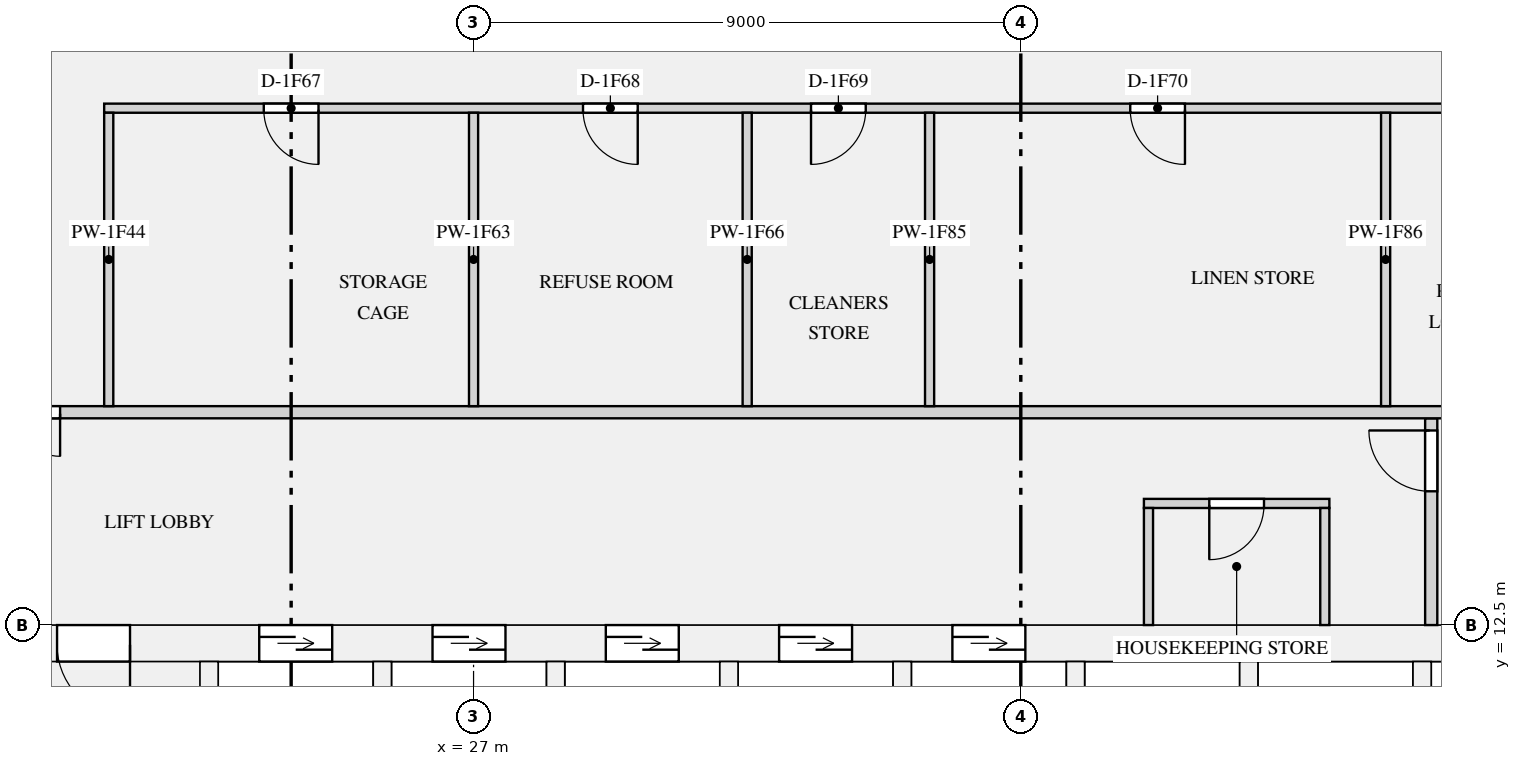
"""IFC4 building model, lengths in metres.
Left out: names, types, materials, properties, quantities, classifications, styles, units other than length and angle.
Written with IfcOpenShell. Run it as: python <this file> out.ifc"""

import sys

from ifc_helpers import new_model, si_unit, direction, frame, frame_2d, origin, place, context, subcontext, project, spatial, rectangle, extrude, element, fill, save


model = new_model("IFC4")
c1 = context("Model", 3, precision=1e-05, world=origin(), true_north=direction((0.0, 1.0)))
c2 = subcontext(c1, "Body", "Model", "MODEL_VIEW")
j1 = project(units=[si_unit("LENGTHUNIT", "METRE"), si_unit("PLANEANGLEUNIT", "RADIAN")], contexts=[c1])
p1 = place(None, origin())
s1 = spatial("IfcSite", under=j1, at=p1, CompositionType="ELEMENT")
p2 = place(p1, origin())
s2 = spatial("IfcBuilding", under=s1, at=p2, CompositionType="ELEMENT")
p3 = place(p2, frame((0.0, 0.0, 60.45)))
s3 = spatial("IfcBuildingStorey", under=s2, at=p3, CompositionType="ELEMENT", Elevation=60.45)
p4 = place(p3, frame((19.0, 12.2, 0.0), z_axis=(0.0, 0.0, 1.0), x_axis=(1.0, 0.0, 0.0)))
e1 = element("IfcWall", 1, at=p4, inside=s3, PredefinedType="SHEAR", context=c2, shape_type="SweptSolid", body=[
    extrude(rectangle(XDim=34.0, YDim=0.6, at=frame_2d((17.0, 0.0))), origin(), (0.0, 0.0, 1.0), 3.15),
])
p5 = place(p4, frame((4.475, 0.0, 0.0)))
e2 = element("IfcOpeningElement", 2, at=p5, cuts=e1, PredefinedType="OPENING", context=c2, shape_type="SweptSolid", body=[
    extrude(rectangle(XDim=1.2, YDim=2.1, at=frame_2d((0.6, 1.05))), frame((0.0, 0.31, 0.0), z_axis=(0.0, -1.0, 0.0), x_axis=(1.0, 0.0, 0.0)), (0.0, 0.0, 1.0), 0.62),
])
p6 = place(p4, frame((7.325, 0.0, 0.0)))
e3 = element("IfcOpeningElement", 3, at=p6, cuts=e1, PredefinedType="OPENING", context=c2, shape_type="SweptSolid", body=[
    extrude(rectangle(XDim=1.2, YDim=2.1, at=frame_2d((0.6, 1.05))), frame((0.0, 0.31, 0.0), z_axis=(0.0, -1.0, 0.0), x_axis=(1.0, 0.0, 0.0)), (0.0, 0.0, 1.0), 0.62),
])
p7 = place(p4, frame((10.175, 0.0, 0.0)))
e4 = element("IfcOpeningElement", 4, at=p7, cuts=e1, PredefinedType="OPENING", context=c2, shape_type="SweptSolid", body=[
    extrude(rectangle(XDim=1.2, YDim=2.1, at=frame_2d((0.6, 1.05))), frame((0.0, 0.31, 0.0), z_axis=(0.0, -1.0, 0.0), x_axis=(1.0, 0.0, 0.0)), (0.0, 0.0, 1.0), 0.62),
])
p8 = place(p4, frame((13.025, 0.0, 0.0)))
e5 = element("IfcOpeningElement", 5, at=p8, cuts=e1, PredefinedType="OPENING", context=c2, shape_type="SweptSolid", body=[
    extrude(rectangle(XDim=1.2, YDim=2.1, at=frame_2d((0.6, 1.05))), frame((0.0, 0.31, 0.0), z_axis=(0.0, -1.0, 0.0), x_axis=(1.0, 0.0, 0.0)), (0.0, 0.0, 1.0), 0.62),
])
p9 = place(p4, frame((15.875, 0.0, 0.0)))
e6 = element("IfcOpeningElement", 6, at=p9, cuts=e1, PredefinedType="OPENING", context=c2, shape_type="SweptSolid", body=[
    extrude(rectangle(XDim=1.2, YDim=2.1, at=frame_2d((0.6, 1.05))), frame((0.0, 0.31, 0.0), z_axis=(0.0, -1.0, 0.0), x_axis=(1.0, 0.0, 0.0)), (0.0, 0.0, 1.0), 0.62),
])
p10 = place(p4, frame((24.175, 0.0, 0.0)))
e7 = element("IfcOpeningElement", 7, at=p10, cuts=e1, PredefinedType="OPENING", context=c2, shape_type="SweptSolid", body=[
    extrude(rectangle(XDim=1.1, YDim=2.1, at=frame_2d((0.55, 1.05))), frame((0.0, 0.31, 0.0), z_axis=(0.0, -1.0, 0.0), x_axis=(1.0, 0.0, 0.0)), (0.0, 0.0, 1.0), 0.62),
])
p11 = place(p4, frame((26.425, 0.0, 0.0)))
e8 = element("IfcOpeningElement", 8, at=p11, cuts=e1, PredefinedType="OPENING", context=c2, shape_type="SweptSolid", body=[
    extrude(rectangle(XDim=1.1, YDim=2.1, at=frame_2d((0.55, 1.05))), frame((0.0, 0.31, 0.0), z_axis=(0.0, -1.0, 0.0), x_axis=(1.0, 0.0, 0.0)), (0.0, 0.0, 1.0), 0.62),
])
p12 = place(p4, frame((28.675, 0.0, 0.0)))
e9 = element("IfcOpeningElement", 9, at=p12, cuts=e1, PredefinedType="OPENING", context=c2, shape_type="SweptSolid", body=[
    extrude(rectangle(XDim=1.1, YDim=2.1, at=frame_2d((0.55, 1.05))), frame((0.0, 0.31, 0.0), z_axis=(0.0, -1.0, 0.0), x_axis=(1.0, 0.0, 0.0)), (0.0, 0.0, 1.0), 0.62),
])
p13 = place(p4, frame((1.15, 0.0, 0.0)))
e10 = element("IfcOpeningElement", 10, at=p13, cuts=e1, PredefinedType="OPENING", context=c2, shape_type="SweptSolid", body=[
    extrude(rectangle(XDim=1.2, YDim=2.1, at=frame_2d((0.6, 1.05))), frame((0.0, 0.31, 0.0), z_axis=(0.0, -1.0, 0.0), x_axis=(1.0, 0.0, 0.0)), (0.0, 0.0, 1.0), 0.62),
])
p14 = place(p4, frame((31.65, 0.0, 0.0)))
e11 = element("IfcOpeningElement", 11, at=p14, cuts=e1, PredefinedType="OPENING", context=c2, shape_type="SweptSolid", body=[
    extrude(rectangle(XDim=1.2, YDim=2.1, at=frame_2d((0.6, 1.05))), frame((0.0, 0.31, 0.0), z_axis=(0.0, -1.0, 0.0), x_axis=(1.0, 0.0, 0.0)), (0.0, 0.0, 1.0), 0.62),
])
for number, where, z_axis, x_axis in (
    (12, (22.65, 9.35, 0.0), (0.0, 0.0, 1.0), (0.0, 1.0, 0.0)),
    (13, (25.5, 9.35, 0.0), (0.0, 0.0, 1.0), (0.0, 1.0, 0.0)),
    (14, (28.35, 9.35, 0.0), (0.0, 0.0, 1.0), (0.0, 1.0, 0.0)),
    (15, (31.2, 9.35, 0.0), (0.0, 0.0, 1.0), (0.0, 1.0, 0.0)),
    (16, (34.05, 9.35, 0.0), (0.0, 0.0, 1.0), (0.0, 1.0, 0.0)),
    (17, (36.9, 9.35, 0.0), (0.0, 0.0, 1.0), (0.0, 1.0, 0.0)),
    (18, (39.75, 9.35, 0.0), (0.0, 0.0, 1.0), (0.0, 1.0, 0.0)),
):
    element("IfcWall", number, at=place(p3, frame(where, z_axis=z_axis, x_axis=x_axis)), inside=s3, PredefinedType="SHEAR", context=c2, shape_type="SweptSolid", body=[
        extrude(rectangle(XDim=2.55, YDim=0.3, at=frame_2d((1.275, 0.0))), origin(), (0.0, 0.0, 1.0), 3.15),
    ])
p15 = place(p3, frame((42.6, 8.25, 0.0), z_axis=(0.0, 0.0, 1.0), x_axis=(0.0, 1.0, 0.0)))
e19 = element("IfcWall", 19, at=p15, inside=s3, PredefinedType="SHEAR", context=c2, shape_type="SweptSolid", body=[
    extrude(rectangle(XDim=3.65, YDim=0.3, at=frame_2d((1.825, 0.0))), origin(), (0.0, 0.0, 1.0), 3.15),
])
p16 = place(p3, frame((38.025, 14.5, 0.0), z_axis=(0.0, 0.0, 1.0), x_axis=(1.0, 0.0, 0.0)))
e20 = element("IfcWall", 20, at=p16, inside=s3, PredefinedType="PARTITIONING", context=c2, shape_type="SweptSolid", body=[
    extrude(rectangle(XDim=3.05, YDim=0.15, at=frame_2d((1.525, 0.0))), origin(), (0.0, 0.0, 1.0), 2.83),
])
p17 = place(p16, frame((1.075, 0.0, 0.0)))
e21 = element("IfcOpeningElement", 21, at=p17, cuts=e20, PredefinedType="OPENING", context=c2, shape_type="SweptSolid", body=[
    extrude(rectangle(XDim=0.9, YDim=2.1, at=frame_2d((0.45, 1.05))), frame((0.0, 0.085, 0.0), z_axis=(0.0, -1.0, 0.0), x_axis=(1.0, 0.0, 0.0)), (0.0, 0.0, 1.0), 0.17),
])
for number, where, z_axis, x_axis in (
    (22, (38.1, 12.5, 0.0), (0.0, 0.0, 1.0), (0.0, 1.0, 0.0)),
    (23, (41.0, 12.5, 0.0), (0.0, 0.0, 1.0), (0.0, 1.0, 0.0)),
):
    element("IfcWall", number, at=place(p3, frame(where, z_axis=z_axis, x_axis=x_axis)), inside=s3, PredefinedType="PARTITIONING", context=c2, shape_type="SweptSolid", body=[
        extrude(rectangle(XDim=1.925, YDim=0.15, at=frame_2d((0.962, 0.0))), origin(), (0.0, 0.0, 1.0), 2.83),
    ])
p18 = place(p3, frame((42.75, 12.5, 0.0), z_axis=(0.0, 0.0, 1.0), x_axis=(0.0, 1.0, 0.0)))
e24 = element("IfcWall", 24, at=p18, inside=s3, PredefinedType="PARTITIONING", context=c2, shape_type="SweptSolid", body=[
    extrude(rectangle(XDim=3.4, YDim=0.2, at=frame_2d((1.7, 0.0))), origin(), (0.0, 0.0, 1.0), 2.83),
])
p19 = place(p18, frame((2.2, 0.0, 0.0)))
e25 = element("IfcOpeningElement", 25, at=p19, cuts=e24, PredefinedType="OPENING", context=c2, shape_type="SweptSolid", body=[
    extrude(rectangle(XDim=1.0, YDim=2.1, at=frame_2d((0.5, 1.05))), frame((0.0, 0.11, 0.0), z_axis=(0.0, -1.0, 0.0), x_axis=(1.0, 0.0, 0.0)), (0.0, 0.0, 1.0), 0.22),
])
p20 = place(p3, frame((20.925, 21.0, 0.0), z_axis=(0.0, 0.0, 1.0), x_axis=(1.0, 0.0, 0.0)))
e26 = element("IfcWall", 26, at=p20, inside=s3, PredefinedType="PARTITIONING", context=c2, shape_type="SweptSolid", body=[
    extrude(rectangle(XDim=30.15, YDim=0.15, at=frame_2d((15.075, 0.0))), origin(), (0.0, 0.0, 1.0), 2.83),
])
p21 = place(p20, frame((2.625, 0.0, 0.0)))
e27 = element("IfcOpeningElement", 27, at=p21, cuts=e26, PredefinedType="OPENING", context=c2, shape_type="SweptSolid", body=[
    extrude(rectangle(XDim=0.9, YDim=2.1, at=frame_2d((0.45, 1.05))), frame((0.0, 0.085, 0.0), z_axis=(0.0, -1.0, 0.0), x_axis=(1.0, 0.0, 0.0)), (0.0, 0.0, 1.0), 0.17),
])
p22 = place(p20, frame((7.875, 0.0, 0.0)))
e28 = element("IfcOpeningElement", 28, at=p22, cuts=e26, PredefinedType="OPENING", context=c2, shape_type="SweptSolid", body=[
    extrude(rectangle(XDim=0.9, YDim=2.1, at=frame_2d((0.45, 1.05))), frame((0.0, 0.085, 0.0), z_axis=(0.0, -1.0, 0.0), x_axis=(1.0, 0.0, 0.0)), (0.0, 0.0, 1.0), 0.17),
])
p23 = place(p20, frame((11.625, 0.0, 0.0)))
e29 = element("IfcOpeningElement", 29, at=p23, cuts=e26, PredefinedType="OPENING", context=c2, shape_type="SweptSolid", body=[
    extrude(rectangle(XDim=0.9, YDim=2.1, at=frame_2d((0.45, 1.05))), frame((0.0, 0.085, 0.0), z_axis=(0.0, -1.0, 0.0), x_axis=(1.0, 0.0, 0.0)), (0.0, 0.0, 1.0), 0.17),
])
p24 = place(p20, frame((16.875, 0.0, 0.0)))
e30 = element("IfcOpeningElement", 30, at=p24, cuts=e26, PredefinedType="OPENING", context=c2, shape_type="SweptSolid", body=[
    extrude(rectangle(XDim=0.9, YDim=2.1, at=frame_2d((0.45, 1.05))), frame((0.0, 0.085, 0.0), z_axis=(0.0, -1.0, 0.0), x_axis=(1.0, 0.0, 0.0)), (0.0, 0.0, 1.0), 0.17),
])
p25 = place(p20, frame((22.875, 0.0, 0.0)))
e31 = element("IfcOpeningElement", 31, at=p25, cuts=e26, PredefinedType="OPENING", context=c2, shape_type="SweptSolid", body=[
    extrude(rectangle(XDim=0.9, YDim=2.1, at=frame_2d((0.45, 1.05))), frame((0.0, 0.085, 0.0), z_axis=(0.0, -1.0, 0.0), x_axis=(1.0, 0.0, 0.0)), (0.0, 0.0, 1.0), 0.17),
])
p26 = place(p3, frame((17.9, 16.0, 0.0), z_axis=(0.0, 0.0, 1.0), x_axis=(1.0, 0.0, 0.0)))
e32 = element("IfcWall", 32, at=p26, inside=s3, PredefinedType="PARTITIONING", context=c2, shape_type="SweptSolid", body=[
    extrude(rectangle(XDim=36.2, YDim=0.2, at=frame_2d((18.1, 0.0))), origin(), (0.0, 0.0, 1.0), 2.83),
])
p27 = place(p26, frame((0.9, 0.0, 0.0)))
e33 = element("IfcOpeningElement", 33, at=p27, cuts=e32, PredefinedType="OPENING", context=c2, shape_type="SweptSolid", body=[
    extrude(rectangle(XDim=1.4, YDim=2.1, at=frame_2d((0.7, 1.05))), frame((0.0, 0.11, 0.0), z_axis=(0.0, -1.0, 0.0), x_axis=(1.0, 0.0, 0.0)), (0.0, 0.0, 1.0), 0.22),
])
p28 = place(p26, frame((33.9, 0.0, 0.0)))
e34 = element("IfcOpeningElement", 34, at=p28, cuts=e32, PredefinedType="OPENING", context=c2, shape_type="SweptSolid", body=[
    extrude(rectangle(XDim=1.4, YDim=2.1, at=frame_2d((0.7, 1.05))), frame((0.0, 0.11, 0.0), z_axis=(0.0, -1.0, 0.0), x_axis=(1.0, 0.0, 0.0)), (0.0, 0.0, 1.0), 0.22),
])
for number, where, z_axis, x_axis in (
    (35, (21.0, 16.1, 0.0), (0.0, 0.0, 1.0), (0.0, 1.0, 0.0)),
    (36, (27.0, 16.1, 0.0), (0.0, 0.0, 1.0), (0.0, 1.0, 0.0)),
    (37, (31.5, 16.1, 0.0), (0.0, 0.0, 1.0), (0.0, 1.0, 0.0)),
    (38, (34.5, 16.1, 0.0), (0.0, 0.0, 1.0), (0.0, 1.0, 0.0)),
    (39, (42.0, 16.1, 0.0), (0.0, 0.0, 1.0), (0.0, 1.0, 0.0)),
):
    element("IfcWall", number, at=place(p3, frame(where, z_axis=z_axis, x_axis=x_axis)), inside=s3, PredefinedType="PARTITIONING", context=c2, shape_type="SweptSolid", body=[
        extrude(rectangle(XDim=4.825, YDim=0.15, at=frame_2d((2.413, 0.0))), origin(), (0.0, 0.0, 1.0), 2.83),
    ])
p29 = place(p5, origin())
e40 = element("IfcDoor", 40, at=p29, inside=s3, OperationType="DOUBLE_DOOR_SLIDING", PredefinedType="DOOR", context=c2, shape_type="SweptSolid", body=[
    extrude(rectangle(XDim=1.2, YDim=2.1, at=frame_2d((0.6, 1.05))), frame((0.0, 0.025, 0.0), z_axis=(0.0, -1.0, 0.0), x_axis=(1.0, 0.0, 0.0)), (0.0, 0.0, 1.0), 0.05),
])
fill(e2, e40)
p30 = place(p6, origin())
e41 = element("IfcDoor", 41, at=p30, inside=s3, OperationType="DOUBLE_DOOR_SLIDING", PredefinedType="DOOR", context=c2, shape_type="SweptSolid", body=[
    extrude(rectangle(XDim=1.2, YDim=2.1, at=frame_2d((0.6, 1.05))), frame((0.0, 0.025, 0.0), z_axis=(0.0, -1.0, 0.0), x_axis=(1.0, 0.0, 0.0)), (0.0, 0.0, 1.0), 0.05),
])
fill(e3, e41)
p31 = place(p7, origin())
e42 = element("IfcDoor", 42, at=p31, inside=s3, OperationType="DOUBLE_DOOR_SLIDING", PredefinedType="DOOR", context=c2, shape_type="SweptSolid", body=[
    extrude(rectangle(XDim=1.2, YDim=2.1, at=frame_2d((0.6, 1.05))), frame((0.0, 0.025, 0.0), z_axis=(0.0, -1.0, 0.0), x_axis=(1.0, 0.0, 0.0)), (0.0, 0.0, 1.0), 0.05),
])
fill(e4, e42)
p32 = place(p8, origin())
e43 = element("IfcDoor", 43, at=p32, inside=s3, OperationType="DOUBLE_DOOR_SLIDING", PredefinedType="DOOR", context=c2, shape_type="SweptSolid", body=[
    extrude(rectangle(XDim=1.2, YDim=2.1, at=frame_2d((0.6, 1.05))), frame((0.0, 0.025, 0.0), z_axis=(0.0, -1.0, 0.0), x_axis=(1.0, 0.0, 0.0)), (0.0, 0.0, 1.0), 0.05),
])
fill(e5, e43)
p33 = place(p9, origin())
e44 = element("IfcDoor", 44, at=p33, inside=s3, OperationType="DOUBLE_DOOR_SLIDING", PredefinedType="DOOR", context=c2, shape_type="SweptSolid", body=[
    extrude(rectangle(XDim=1.2, YDim=2.1, at=frame_2d((0.6, 1.05))), frame((0.0, 0.025, 0.0), z_axis=(0.0, -1.0, 0.0), x_axis=(1.0, 0.0, 0.0)), (0.0, 0.0, 1.0), 0.05),
])
fill(e6, e44)
p34 = place(p17, frame((0.9, 0.0, 0.0), z_axis=(0.0, 0.0, 1.0), x_axis=(-1.0, 0.0, 0.0)))
e45 = element("IfcDoor", 45, at=p34, inside=s3, OperationType="SINGLE_SWING_RIGHT", PredefinedType="DOOR", context=c2, shape_type="SweptSolid", body=[
    extrude(rectangle(XDim=0.9, YDim=2.1, at=frame_2d((0.45, 1.05))), frame((0.0, 0.025, 0.0), z_axis=(0.0, -1.0, 0.0), x_axis=(1.0, 0.0, 0.0)), (0.0, 0.0, 1.0), 0.05),
])
fill(e21, e45)
p35 = place(p13, frame((1.2, 0.0, 0.0), z_axis=(0.0, 0.0, 1.0), x_axis=(-1.0, 0.0, 0.0)))
e46 = element("IfcDoor", 46, at=p35, inside=s3, OperationType="SINGLE_SWING_LEFT", PredefinedType="DOOR", context=c2, shape_type="SweptSolid", body=[
    extrude(rectangle(XDim=1.2, YDim=2.1, at=frame_2d((0.6, 1.05))), frame((0.0, 0.025, 0.0), z_axis=(0.0, -1.0, 0.0), x_axis=(1.0, 0.0, 0.0)), (0.0, 0.0, 1.0), 0.05),
])
fill(e10, e46)
p36 = place(p19, origin())
e47 = element("IfcDoor", 47, at=p36, inside=s3, OperationType="SINGLE_SWING_RIGHT", PredefinedType="DOOR", context=c2, shape_type="SweptSolid", body=[
    extrude(rectangle(XDim=1.0, YDim=2.1, at=frame_2d((0.5, 1.05))), frame((0.0, 0.025, 0.0), z_axis=(0.0, -1.0, 0.0), x_axis=(1.0, 0.0, 0.0)), (0.0, 0.0, 1.0), 0.05),
])
fill(e25, e47)
p37 = place(p27, frame((1.4, 0.0, 0.0), z_axis=(0.0, 0.0, 1.0), x_axis=(-1.0, 0.0, 0.0)))
e48 = element("IfcDoor", 48, at=p37, inside=s3, OperationType="DOUBLE_DOOR_SINGLE_SWING", PredefinedType="DOOR", context=c2, shape_type="SweptSolid", body=[
    extrude(rectangle(XDim=1.4, YDim=2.1, at=frame_2d((0.7, 1.05))), frame((0.0, 0.025, 0.0), z_axis=(0.0, -1.0, 0.0), x_axis=(1.0, 0.0, 0.0)), (0.0, 0.0, 1.0), 0.05),
])
fill(e33, e48)
p38 = place(p21, frame((0.9, 0.0, 0.0), z_axis=(0.0, 0.0, 1.0), x_axis=(-1.0, 0.0, 0.0)))
e49 = element("IfcDoor", 49, at=p38, inside=s3, OperationType="SINGLE_SWING_LEFT", PredefinedType="DOOR", context=c2, shape_type="SweptSolid", body=[
    extrude(rectangle(XDim=0.9, YDim=2.1, at=frame_2d((0.45, 1.05))), frame((0.0, 0.025, 0.0), z_axis=(0.0, -1.0, 0.0), x_axis=(1.0, 0.0, 0.0)), (0.0, 0.0, 1.0), 0.05),
])
fill(e27, e49)
p39 = place(p22, frame((0.9, 0.0, 0.0), z_axis=(0.0, 0.0, 1.0), x_axis=(-1.0, 0.0, 0.0)))
e50 = element("IfcDoor", 50, at=p39, inside=s3, OperationType="SINGLE_SWING_LEFT", PredefinedType="DOOR", context=c2, shape_type="SweptSolid", body=[
    extrude(rectangle(XDim=0.9, YDim=2.1, at=frame_2d((0.45, 1.05))), frame((0.0, 0.025, 0.0), z_axis=(0.0, -1.0, 0.0), x_axis=(1.0, 0.0, 0.0)), (0.0, 0.0, 1.0), 0.05),
])
fill(e28, e50)
p40 = place(p23, frame((0.9, 0.0, 0.0), z_axis=(0.0, 0.0, 1.0), x_axis=(-1.0, 0.0, 0.0)))
e51 = element("IfcDoor", 51, at=p40, inside=s3, OperationType="SINGLE_SWING_RIGHT", PredefinedType="DOOR", context=c2, shape_type="SweptSolid", body=[
    extrude(rectangle(XDim=0.9, YDim=2.1, at=frame_2d((0.45, 1.05))), frame((0.0, 0.025, 0.0), z_axis=(0.0, -1.0, 0.0), x_axis=(1.0, 0.0, 0.0)), (0.0, 0.0, 1.0), 0.05),
])
fill(e29, e51)
p41 = place(p24, frame((0.9, 0.0, 0.0), z_axis=(0.0, 0.0, 1.0), x_axis=(-1.0, 0.0, 0.0)))
e52 = element("IfcDoor", 52, at=p41, inside=s3, OperationType="SINGLE_SWING_LEFT", PredefinedType="DOOR", context=c2, shape_type="SweptSolid", body=[
    extrude(rectangle(XDim=0.9, YDim=2.1, at=frame_2d((0.45, 1.05))), frame((0.0, 0.025, 0.0), z_axis=(0.0, -1.0, 0.0), x_axis=(1.0, 0.0, 0.0)), (0.0, 0.0, 1.0), 0.05),
])
fill(e30, e52)
save(model, sys.argv[1])
